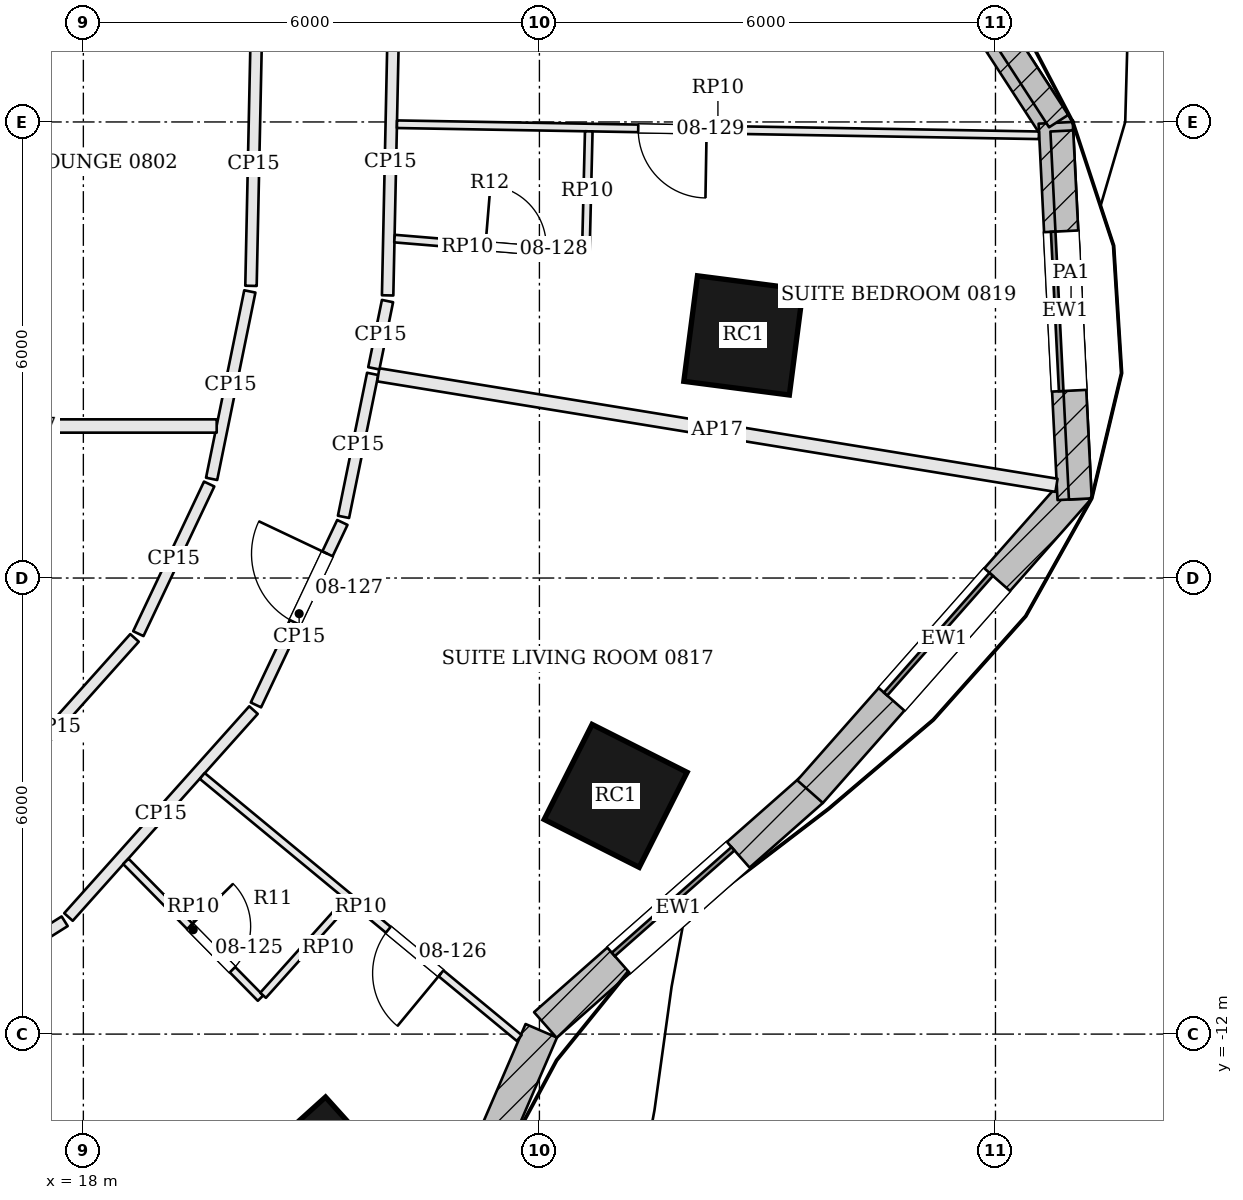
"""IFC4 building model, lengths in metres.
Left out: names, types, materials, properties, quantities, classifications, styles, units other than length and angle.
Written with IfcOpenShell. Run it as: python <this file> out.ifc"""

import sys

from ifc_helpers import new_model, si_unit, direction, frame, frame_2d, origin, origin_2d, place, context, subcontext, project, spatial, rectangle, extrude, element, fill, save


model = new_model("IFC4")
c1 = context("Model", 3, precision=1e-05, world=origin(), true_north=direction((0.0, 1.0)))
c2 = subcontext(c1, "Body", "Model", "MODEL_VIEW")
j1 = project(units=[si_unit("LENGTHUNIT", "METRE"), si_unit("PLANEANGLEUNIT", "RADIAN")], contexts=[c1])
p1 = place(None, origin())
s1 = spatial("IfcSite", under=j1, at=p1, CompositionType="ELEMENT")
p2 = place(p1, origin())
s2 = spatial("IfcBuilding", under=s1, at=p2, CompositionType="ELEMENT")
p3 = place(p2, frame((0.0, 0.0, 44.7)))
s3 = spatial("IfcBuildingStorey", under=s2, at=p3, CompositionType="ELEMENT", Elevation=44.7)
for number, where, z_axis, x_axis in (
    (1, (21.135, -13.817, 0.0), (0.0, 0.0, 1.0), (0.743, 0.67, 0.0)),
    (2, (25.003, -8.866, 0.0), (0.0, 0.0, 1.0), (0.45, 0.893, 0.0)),
    (3, (26.684, -2.808, 0.0), (0.0, 0.0, 1.0), (0.128, 0.992, 0.0)),
):
    element("IfcColumn", number, at=place(p3, frame(where, z_axis=z_axis, x_axis=x_axis)), inside=s3, PredefinedType="COLUMN", context=c2, shape_type="SweptSolid", body=[
        extrude(rectangle(XDim=1.4, YDim=1.4, at=origin_2d()), origin(), (0.0, 0.0, 1.0), 3.6),
    ])
p4 = place(p3, frame((30.825, -0.117, 0.0), z_axis=(0.0, 0.0, 1.0), x_axis=(-0.543975629516, 0.839101015666, 0.0)))
e4 = element("IfcWall", 4, at=p4, inside=s3, PredefinedType="SOLIDWALL", context=c2, shape_type="SweptSolid", body=[
    extrude(rectangle(XDim=5.281, YDim=0.45, at=frame_2d((2.641, 0.0))), origin(), (0.0, 0.0, 1.0), 3.4),
])
p5 = place(p4, frame((1.591, 0.0, 0.9)))
e5 = element("IfcOpeningElement", 5, at=p5, cuts=e4, PredefinedType="OPENING", context=c2, shape_type="SweptSolid", body=[
    extrude(rectangle(XDim=2.1, YDim=2.0, at=frame_2d((1.05, 1.0))), frame((0.0, 0.235, 0.0), z_axis=(0.0, -1.0, 0.0), x_axis=(1.0, 0.0, 0.0)), (0.0, 0.0, 1.0), 0.47),
])
p6 = place(p3, frame((21.835, -17.032, 0.0), z_axis=(0.0, 0.0, 1.0), x_axis=(0.396103523022, 0.918205858753, 0.0)))
e6 = element("IfcWall", 6, at=p6, inside=s3, PredefinedType="SOLIDWALL", context=c2, shape_type="SweptSolid", body=[
    extrude(rectangle(XDim=5.528, YDim=0.45, at=frame_2d((2.764, 0.0))), origin(), (0.0, 0.0, 1.0), 3.4),
])
p7 = place(p6, frame((1.714, 0.0, 0.9)))
e7 = element("IfcOpeningElement", 7, at=p7, cuts=e6, PredefinedType="OPENING", context=c2, shape_type="SweptSolid", body=[
    extrude(rectangle(XDim=2.1, YDim=2.0, at=frame_2d((1.05, 1.0))), frame((0.0, 0.235, 0.0), z_axis=(0.0, -1.0, 0.0), x_axis=(1.0, 0.0, 0.0)), (0.0, 0.0, 1.0), 0.47),
])
p8 = place(p3, frame((24.078, -11.88, 0.0), z_axis=(0.0, 0.0, 1.0), x_axis=(0.749778352475, 0.661689067583, 0.0)))
e8 = element("IfcWall", 8, at=p8, inside=s3, PredefinedType="SOLIDWALL", context=c2, shape_type="SweptSolid", body=[
    extrude(rectangle(XDim=4.67, YDim=0.45, at=frame_2d((2.335, 0.0))), origin(), (0.0, 0.0, 1.0), 3.4),
])
p9 = place(p8, frame((1.285, 0.0, 0.9)))
e9 = element("IfcOpeningElement", 9, at=p9, cuts=e8, PredefinedType="OPENING", context=c2, shape_type="SweptSolid", body=[
    extrude(rectangle(XDim=2.1, YDim=2.0, at=frame_2d((1.05, 1.0))), frame((0.0, 0.235, 0.0), z_axis=(0.0, -1.0, 0.0), x_axis=(1.0, 0.0, 0.0)), (0.0, 0.0, 1.0), 0.47),
])
p10 = place(p3, frame((27.561, -8.81, 0.0), z_axis=(0.0, 0.0, 1.0), x_axis=(0.661706312809, 0.749763132989, 0.0)))
e10 = element("IfcWall", 10, at=p10, inside=s3, PredefinedType="SOLIDWALL", context=c2, shape_type="SweptSolid", body=[
    extrude(rectangle(XDim=5.34, YDim=0.45, at=frame_2d((2.67, 0.0))), origin(), (0.0, 0.0, 1.0), 3.4),
])
p11 = place(p10, frame((1.62, 0.0, 0.9)))
e11 = element("IfcOpeningElement", 11, at=p11, cuts=e10, PredefinedType="OPENING", context=c2, shape_type="SweptSolid", body=[
    extrude(rectangle(XDim=2.1, YDim=2.0, at=frame_2d((1.05, 1.0))), frame((0.0, 0.235, 0.0), z_axis=(0.0, -1.0, 0.0), x_axis=(1.0, 0.0, 0.0)), (0.0, 0.0, 1.0), 0.47),
])
p12 = place(p3, frame((31.041, -4.963, 0.0), z_axis=(0.0, 0.0, 1.0), x_axis=(-0.050222481563, 0.99873805492, 0.0)))
e12 = element("IfcWall", 12, at=p12, inside=s3, PredefinedType="SOLIDWALL", context=c2, shape_type="SweptSolid", body=[
    extrude(rectangle(XDim=4.958, YDim=0.45, at=frame_2d((2.479, 0.0))), origin(), (0.0, 0.0, 1.0), 3.4),
])
p13 = place(p12, frame((1.429, 0.0, 0.9)))
e13 = element("IfcOpeningElement", 13, at=p13, cuts=e12, PredefinedType="OPENING", context=c2, shape_type="SweptSolid", body=[
    extrude(rectangle(XDim=2.1, YDim=2.0, at=frame_2d((1.05, 1.0))), frame((0.0, 0.235, 0.0), z_axis=(0.0, -1.0, 0.0), x_axis=(1.0, 0.0, 0.0)), (0.0, 0.0, 1.0), 0.47),
])
p14 = place(p3, frame((30.831, 0.011, 3.6), z_axis=(0.0, 0.0, 1.0), x_axis=(-0.543918219167, 0.839138231079, 0.0)))
e14 = element("IfcWall", 14, at=p14, inside=s3, PredefinedType="PARAPET", context=c2, shape_type="SweptSolid", body=[
    extrude(rectangle(XDim=5.174, YDim=0.3, at=frame_2d((2.587, 0.0))), origin(), (0.0, 0.0, 1.0), 1.1),
])
p15 = place(p3, frame((31.116, -4.959, 3.6), z_axis=(0.0, 0.0, 1.0), x_axis=(-0.05021140618, 0.998738611795, 0.0)))
e15 = element("IfcWall", 15, at=p15, inside=s3, PredefinedType="PARAPET", context=c2, shape_type="SweptSolid", body=[
    extrude(rectangle(XDim=4.848, YDim=0.3, at=frame_2d((2.424, 0.0))), origin(), (0.0, 0.0, 1.0), 1.1),
])
p16 = place(p3, frame((15.724, -11.795, 0.0), z_axis=(0.0, 0.0, 1.0), x_axis=(0.846020384979, 0.533150549283, 0.0)))
e16 = element("IfcWall", 16, at=p16, inside=s3, PredefinedType="PARTITIONING", context=c2, shape_type="SweptSolid", body=[
    extrude(rectangle(XDim=2.399, YDim=0.15, at=frame_2d((1.2, 0.0))), origin(), (0.0, 0.0, 1.0), 2.68),
])
p17 = place(p3, frame((17.804, -10.46, 0.0), z_axis=(0.0, 0.0, 1.0), x_axis=(0.666597463623, 0.745417883802, 0.0)))
e17 = element("IfcWall", 17, at=p17, inside=s3, PredefinedType="PARTITIONING", context=c2, shape_type="SweptSolid", body=[
    extrude(rectangle(XDim=3.652, YDim=0.15, at=frame_2d((1.826, 0.0))), origin(), (0.0, 0.0, 1.0), 2.68),
])
p18 = place(p3, frame((20.271, -7.67, 0.0), z_axis=(0.0, 0.0, 1.0), x_axis=(0.427995478521, 0.903780875193, 0.0)))
e18 = element("IfcWall", 18, at=p18, inside=s3, PredefinedType="PARTITIONING", context=c2, shape_type="SweptSolid", body=[
    extrude(rectangle(XDim=2.656, YDim=0.15, at=frame_2d((1.328, 0.0))), origin(), (0.0, 0.0, 1.0), 2.68),
])
p19 = place(p18, frame((1.2, 0.0, 0.0)))
e19 = element("IfcOpeningElement", 19, at=p19, cuts=e18, PredefinedType="OPENING", context=c2, shape_type="SweptSolid", body=[
    extrude(rectangle(XDim=1.0, YDim=2.1, at=frame_2d((0.5, 1.05))), frame((0.0, 0.085, 0.0), z_axis=(0.0, -1.0, 0.0), x_axis=(1.0, 0.0, 0.0)), (0.0, 0.0, 1.0), 0.17),
])
p20 = place(p3, frame((21.423, -5.195, 0.0), z_axis=(0.0, 0.0, 1.0), x_axis=(0.199808007721, 0.97983506778, 0.0)))
e20 = element("IfcWall", 20, at=p20, inside=s3, PredefinedType="PARTITIONING", context=c2, shape_type="SweptSolid", body=[
    extrude(rectangle(XDim=1.92, YDim=0.15, at=frame_2d((0.96, 0.0))), origin(), (0.0, 0.0, 1.0), 2.68),
])
p21 = place(p3, frame((30.803, -4.78, 0.0), z_axis=(0.0, 0.0, 1.0), x_axis=(-0.98698803995, 0.160793684567, 0.0)))
e21 = element("IfcWall", 21, at=p21, inside=s3, PredefinedType="PARTITIONING", context=c2, shape_type="SweptSolid", body=[
    extrude(rectangle(XDim=9.04, YDim=0.175, at=frame_2d((4.52, 0.0))), origin(), (0.0, 0.0, 1.0), 2.68),
])
p22 = place(p3, frame((21.821, -3.241, 0.0), z_axis=(0.0, 0.0, 1.0), x_axis=(0.199859337249, 0.97982459926, 0.0)))
e22 = element("IfcWall", 22, at=p22, inside=s3, PredefinedType="PARTITIONING", context=c2, shape_type="SweptSolid", body=[
    extrude(rectangle(XDim=0.903, YDim=0.15, at=frame_2d((0.451, 0.0))), origin(), (0.0, 0.0, 1.0), 2.68),
])
p23 = place(p3, frame((22.003, -2.281, 0.0), z_axis=(0.0, 0.0, 1.0), x_axis=(0.021172866829, 0.999775829729, 0.0)))
e23 = element("IfcWall", 23, at=p23, inside=s3, PredefinedType="PARTITIONING", context=c2, shape_type="SweptSolid", body=[
    extrude(rectangle(XDim=3.517, YDim=0.15, at=frame_2d((1.758, 0.0))), origin(), (0.0, 0.0, 1.0), 2.68),
])
p24 = place(p3, frame((20.273, 1.061, 0.0), z_axis=(0.0, 0.0, 1.0), x_axis=(-0.021166906337, -0.99977595594, 0.0)))
e24 = element("IfcWall", 24, at=p24, inside=s3, PredefinedType="PARTITIONING", context=c2, shape_type="SweptSolid", body=[
    extrude(rectangle(XDim=3.218, YDim=0.15, at=frame_2d((1.609, 0.0))), origin(), (0.0, 0.0, 1.0), 2.68),
])
p25 = place(p3, frame((20.19, -2.229, 0.0), z_axis=(0.0, 0.0, 1.0), x_axis=(-0.199752828647, -0.97984631828, 0.0)))
e25 = element("IfcWall", 25, at=p25, inside=s3, PredefinedType="PARTITIONING", context=c2, shape_type="SweptSolid", body=[
    extrude(rectangle(XDim=2.517, YDim=0.15, at=frame_2d((1.258, 0.0))), origin(), (0.0, 0.0, 1.0), 2.68),
])
p26 = place(p3, frame((19.655, -4.763, 0.0), z_axis=(0.0, 0.0, 1.0), x_axis=(-0.427965880464, -0.903794891089, 0.0)))
e26 = element("IfcWall", 26, at=p26, inside=s3, PredefinedType="PARTITIONING", context=c2, shape_type="SweptSolid", body=[
    extrude(rectangle(XDim=2.178, YDim=0.15, at=frame_2d((1.089, 0.0))), origin(), (0.0, 0.0, 1.0), 2.68),
])
p27 = place(p3, frame((18.673, -6.788, 0.0), z_axis=(0.0, 0.0, 1.0), x_axis=(-0.666610670036, -0.745406073623, 0.0)))
e27 = element("IfcWall", 27, at=p27, inside=s3, PredefinedType="PARTITIONING", context=c2, shape_type="SweptSolid", body=[
    extrude(rectangle(XDim=3.139, YDim=0.15, at=frame_2d((1.569, 0.0))), origin(), (0.0, 0.0, 1.0), 2.68),
])
p28 = place(p3, frame((23.734, -12.051, 0.0), z_axis=(0.0, 0.0, 1.0), x_axis=(-0.77073049993, 0.637161279801, 0.0)))
e28 = element("IfcWall", 28, at=p28, inside=s3, PredefinedType="PARTITIONING", context=c2, shape_type="SweptSolid", body=[
    extrude(rectangle(XDim=5.41, YDim=0.1, at=frame_2d((2.705, 0.0))), origin(), (0.0, 0.0, 1.0), 2.68),
])
p29 = place(p28, frame((1.335, 0.0, 0.0)))
e29 = element("IfcOpeningElement", 29, at=p29, cuts=e28, PredefinedType="OPENING", context=c2, shape_type="SweptSolid", body=[
    extrude(rectangle(XDim=0.9, YDim=2.4, at=frame_2d((0.45, 1.2))), frame((0.0, 0.06, 0.0), z_axis=(0.0, -1.0, 0.0), x_axis=(1.0, 0.0, 0.0)), (0.0, 0.0, 1.0), 0.12),
])
p30 = place(p3, frame((18.559, -9.728, 0.0), z_axis=(0.0, 0.0, 1.0), x_axis=(0.701671470807, -0.712500629513, 0.0)))
e30 = element("IfcWall", 30, at=p30, inside=s3, PredefinedType="PARTITIONING", context=c2, shape_type="SweptSolid", body=[
    extrude(rectangle(XDim=2.525, YDim=0.1, at=frame_2d((1.262, 0.0))), origin(), (0.0, 0.0, 1.0), 2.68),
])
p31 = place(p30, frame((1.2, 0.0, 0.0)))
e31 = element("IfcOpeningElement", 31, at=p31, cuts=e30, PredefinedType="OPENING", context=c2, shape_type="SweptSolid", body=[
    extrude(rectangle(XDim=0.8, YDim=2.1, at=frame_2d((0.4, 1.05))), frame((0.0, 0.06, 0.0), z_axis=(0.0, -1.0, 0.0), x_axis=(1.0, 0.0, 0.0)), (0.0, 0.0, 1.0), 0.12),
])
p32 = place(p3, frame((20.364, -11.49, 0.0), z_axis=(0.0, 0.0, 1.0), x_axis=(0.667968030359, 0.744189969307, 0.0)))
e32 = element("IfcWall", 32, at=p32, inside=s3, PredefinedType="PARTITIONING", context=c2, shape_type="SweptSolid", body=[
    extrude(rectangle(XDim=1.666, YDim=0.1, at=frame_2d((0.833, 0.0))), origin(), (0.0, 0.0, 1.0), 2.68),
])
p33 = place(p3, frame((30.571, -0.175, 0.0), z_axis=(0.0, 0.0, 1.0), x_axis=(-0.999851615206, 0.017226362636, 0.0)))
e33 = element("IfcWall", 33, at=p33, inside=s3, PredefinedType="PARTITIONING", context=c2, shape_type="SweptSolid", body=[
    extrude(rectangle(XDim=8.447, YDim=0.1, at=frame_2d((4.223, 0.0))), origin(), (0.0, 0.0, 1.0), 2.68),
])
p34 = place(p33, frame((4.372, 0.0, 0.0)))
e34 = element("IfcOpeningElement", 34, at=p34, cuts=e33, PredefinedType="OPENING", context=c2, shape_type="SweptSolid", body=[
    extrude(rectangle(XDim=0.9, YDim=2.4, at=frame_2d((0.45, 1.2))), frame((0.0, 0.06, 0.0), z_axis=(0.0, -1.0, 0.0), x_axis=(1.0, 0.0, 0.0)), (0.0, 0.0, 1.0), 0.12),
])
p35 = place(p3, frame((22.094, -1.534, 0.0), z_axis=(0.0, 0.0, 1.0), x_axis=(0.996584989286, -0.082573356054, 0.0)))
e35 = element("IfcWall", 35, at=p35, inside=s3, PredefinedType="PARTITIONING", context=c2, shape_type="SweptSolid", body=[
    extrude(rectangle(XDim=2.525, YDim=0.1, at=frame_2d((1.262, 0.0))), origin(), (0.0, 0.0, 1.0), 2.68),
])
p36 = place(p35, frame((1.2, 0.0, 0.0)))
e36 = element("IfcOpeningElement", 36, at=p36, cuts=e35, PredefinedType="OPENING", context=c2, shape_type="SweptSolid", body=[
    extrude(rectangle(XDim=0.8, YDim=2.1, at=frame_2d((0.4, 1.05))), frame((0.0, 0.06, 0.0), z_axis=(0.0, -1.0, 0.0), x_axis=(1.0, 0.0, 0.0)), (0.0, 0.0, 1.0), 0.12),
])
p37 = place(p3, frame((24.611, -1.693, 0.0), z_axis=(0.0, 0.0, 1.0), x_axis=(0.02410249982, 0.999709492554, 0.0)))
e37 = element("IfcWall", 37, at=p37, inside=s3, PredefinedType="PARTITIONING", context=c2, shape_type="SweptSolid", body=[
    extrude(rectangle(XDim=1.57, YDim=0.1, at=frame_2d((0.785, 0.0))), origin(), (0.0, 0.0, 1.0), 2.68),
])
p38 = place(p3, frame((14.875, -4.0, 0.0), z_axis=(0.0, 0.0, 1.0), x_axis=(1.0, 0.0, 0.0)))
e38 = element("IfcWall", 38, at=p38, inside=s3, PredefinedType="PARTITIONING", context=c2, shape_type="SweptSolid", body=[
    extrude(rectangle(XDim=4.879, YDim=0.175, at=frame_2d((2.439, 0.0))), origin(), (0.0, 0.0, 1.0), 2.68),
])
p39 = place(p9, origin())
e39 = element("IfcWindow", 39, at=p39, inside=s3, PartitioningType="SINGLE_PANEL", PredefinedType="WINDOW", context=c2, shape_type="SweptSolid", body=[
    extrude(rectangle(XDim=2.1, YDim=2.0, at=frame_2d((1.05, 1.0))), frame((0.0, 0.135, 0.0), z_axis=(0.0, -1.0, 0.0), x_axis=(1.0, 0.0, 0.0)), (0.0, 0.0, 1.0), 0.06),
])
fill(e9, e39)
p40 = place(p11, origin())
e40 = element("IfcWindow", 40, at=p40, inside=s3, PartitioningType="SINGLE_PANEL", PredefinedType="WINDOW", context=c2, shape_type="SweptSolid", body=[
    extrude(rectangle(XDim=2.1, YDim=2.0, at=frame_2d((1.05, 1.0))), frame((0.0, 0.135, 0.0), z_axis=(0.0, -1.0, 0.0), x_axis=(1.0, 0.0, 0.0)), (0.0, 0.0, 1.0), 0.06),
])
fill(e11, e40)
p41 = place(p13, origin())
e41 = element("IfcWindow", 41, at=p41, inside=s3, PartitioningType="SINGLE_PANEL", PredefinedType="WINDOW", context=c2, shape_type="SweptSolid", body=[
    extrude(rectangle(XDim=2.1, YDim=2.0, at=frame_2d((1.05, 1.0))), frame((0.0, 0.135, 0.0), z_axis=(0.0, -1.0, 0.0), x_axis=(1.0, 0.0, 0.0)), (0.0, 0.0, 1.0), 0.06),
])
fill(e13, e41)
p42 = place(p31, origin())
e42 = element("IfcDoor", 42, at=p42, inside=s3, OperationType="SINGLE_SWING_LEFT", PredefinedType="DOOR", context=c2, shape_type="SweptSolid", body=[
    extrude(rectangle(XDim=0.8, YDim=2.1, at=frame_2d((0.4, 1.05))), frame((0.0, 0.025, 0.0), z_axis=(0.0, -1.0, 0.0), x_axis=(1.0, 0.0, 0.0)), (0.0, 0.0, 1.0), 0.05),
])
fill(e31, e42)
p43 = place(p29, origin())
e43 = element("IfcDoor", 43, at=p43, inside=s3, OperationType="SINGLE_SWING_LEFT", PredefinedType="DOOR", context=c2, shape_type="SweptSolid", body=[
    extrude(rectangle(XDim=0.9, YDim=2.4, at=frame_2d((0.45, 1.2))), frame((0.0, 0.025, 0.0), z_axis=(0.0, -1.0, 0.0), x_axis=(1.0, 0.0, 0.0)), (0.0, 0.0, 1.0), 0.05),
])
fill(e29, e43)
p44 = place(p19, origin())
e44 = element("IfcDoor", 44, at=p44, inside=s3, OperationType="SINGLE_SWING_RIGHT", PredefinedType="DOOR", context=c2, shape_type="SweptSolid", body=[
    extrude(rectangle(XDim=1.0, YDim=2.1, at=frame_2d((0.5, 1.05))), frame((0.0, 0.025, 0.0), z_axis=(0.0, -1.0, 0.0), x_axis=(1.0, 0.0, 0.0)), (0.0, 0.0, 1.0), 0.05),
])
fill(e19, e44)
p45 = place(p36, origin())
e45 = element("IfcDoor", 45, at=p45, inside=s3, OperationType="SINGLE_SWING_LEFT", PredefinedType="DOOR", context=c2, shape_type="SweptSolid", body=[
    extrude(rectangle(XDim=0.8, YDim=2.1, at=frame_2d((0.4, 1.05))), frame((0.0, 0.025, 0.0), z_axis=(0.0, -1.0, 0.0), x_axis=(1.0, 0.0, 0.0)), (0.0, 0.0, 1.0), 0.05),
])
fill(e36, e45)
p46 = place(p34, origin())
e46 = element("IfcDoor", 46, at=p46, inside=s3, OperationType="SINGLE_SWING_LEFT", PredefinedType="DOOR", context=c2, shape_type="SweptSolid", body=[
    extrude(rectangle(XDim=0.9, YDim=2.4, at=frame_2d((0.45, 1.2))), frame((0.0, 0.025, 0.0), z_axis=(0.0, -1.0, 0.0), x_axis=(1.0, 0.0, 0.0)), (0.0, 0.0, 1.0), 0.05),
])
fill(e34, e46)
save(model, sys.argv[1])
